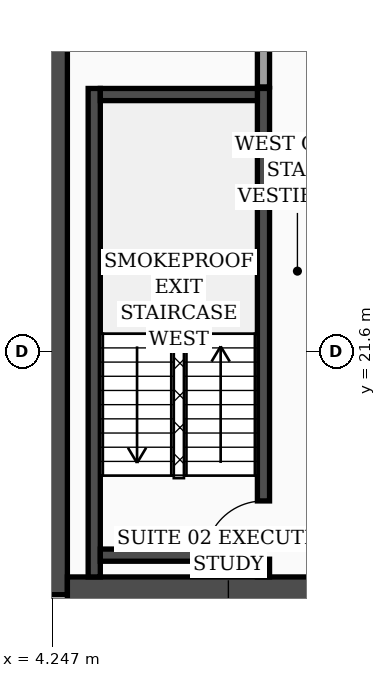
"""IFC4 building model, lengths in metres.
Left out: names, types, materials, properties, quantities, classifications, styles, units other than length and angle.
Written with IfcOpenShell. Run it as: python <this file> out.ifc"""

import sys

from ifc_helpers import new_model, si_unit, direction, frame, frame_2d, origin, place, context, subcontext, project, spatial, rectangle, extrude, element, fill, save


model = new_model("IFC4")
c1 = context("Model", 3, precision=1e-05, world=origin(), true_north=direction((0.0, 1.0)))
c2 = subcontext(c1, "Body", "Model", "MODEL_VIEW")
j1 = project(units=[si_unit("LENGTHUNIT", "METRE"), si_unit("PLANEANGLEUNIT", "RADIAN")], contexts=[c1])
p1 = place(None, origin())
s1 = spatial("IfcSite", under=j1, at=p1, CompositionType="ELEMENT")
p2 = place(p1, origin())
s2 = spatial("IfcBuilding", under=s1, at=p2, CompositionType="ELEMENT")
p3 = place(p2, frame((0.0, 0.0, 199.6)))
s3 = spatial("IfcBuildingStorey", under=s2, at=p3, CompositionType="ELEMENT", Elevation=199.6)
p4 = place(p3, frame((4.2, 16.8, 0.0), z_axis=(0.0, 0.0, 1.0), x_axis=(0.0, 1.0, 0.0)))
e1 = element("IfcWall", 1, at=p4, inside=s3, PredefinedType="SHEAR", context=c2, shape_type="SweptSolid", body=[
    extrude(rectangle(XDim=21.6, YDim=0.7, at=frame_2d((10.8, 0.0))), origin(), (0.0, 0.0, 1.0), 3.56),
])
p5 = place(p3, frame((4.55, 16.8, 0.0), z_axis=(0.0, 0.0, 1.0), x_axis=(1.0, 0.0, 0.0)))
e2 = element("IfcWall", 2, at=p5, inside=s3, PredefinedType="SHEAR", context=c2, shape_type="SweptSolid", body=[
    extrude(rectangle(XDim=10.1, YDim=0.7, at=frame_2d((5.05, 0.0))), origin(), (0.0, 0.0, 1.0), 3.56),
])
p6 = place(p3, frame((5.08, 17.15, 0.0), z_axis=(0.0, 0.0, 1.0), x_axis=(0.0, 1.0, 0.0)))
e3 = element("IfcWall", 3, at=p6, inside=s3, PredefinedType="SOLIDWALL", context=c2, shape_type="SweptSolid", body=[
    extrude(rectangle(XDim=9.64, YDim=0.24, at=frame_2d((4.82, 0.0))), origin(), (0.0, 0.0, 1.0), 3.56),
])
p7 = place(p3, frame((8.42, 17.15, 0.0), z_axis=(0.0, 0.0, 1.0), x_axis=(0.0, 1.0, 0.0)))
e4 = element("IfcWall", 4, at=p7, inside=s3, PredefinedType="SOLIDWALL", context=c2, shape_type="SweptSolid", body=[
    extrude(rectangle(XDim=9.64, YDim=0.24, at=frame_2d((4.82, 0.0))), origin(), (0.0, 0.0, 1.0), 3.56),
])
p8 = place(p7, frame((0.35, 0.0, 0.0)))
e5 = element("IfcOpeningElement", 5, at=p8, cuts=e4, PredefinedType="OPENING", context=c2, shape_type="SweptSolid", body=[
    extrude(rectangle(XDim=1.15, YDim=2.2, at=frame_2d((0.575, 1.1))), frame((0.0, 0.13, 0.0), z_axis=(0.0, -1.0, 0.0), x_axis=(1.0, 0.0, 0.0)), (0.0, 0.0, 1.0), 0.26),
])
for number, where, z_axis, x_axis in (
    (6, (5.2, 17.58, 0.0), (0.0, 0.0, 1.0), (1.0, 0.0, 0.0)),
    (7, (5.2, 26.67, 0.0), (0.0, 0.0, 1.0), (1.0, 0.0, 0.0)),
):
    element("IfcWall", number, at=place(p3, frame(where, z_axis=z_axis, x_axis=x_axis)), inside=s3, PredefinedType="SOLIDWALL", context=c2, shape_type="SweptSolid", body=[
        extrude(rectangle(XDim=3.1, YDim=0.24, at=frame_2d((1.55, 0.0))), origin(), (0.0, 0.0, 1.0), 3.56),
    ])
p9 = place(p3, frame((8.42, 26.82, 0.0), z_axis=(0.0, 0.0, 1.0), x_axis=(0.0, 1.0, 0.0)))
e8 = element("IfcWall", 8, at=p9, inside=s3, PredefinedType="SOLIDWALL", context=c2, shape_type="SweptSolid", body=[
    extrude(rectangle(XDim=3.0, YDim=0.24, at=frame_2d((1.5, 0.0))), origin(), (0.0, 0.0, 1.0), 3.56),
])
p10 = place(p9, frame((0.9, 0.0, 0.0)))
e9 = element("IfcOpeningElement", 9, at=p10, cuts=e8, PredefinedType="OPENING", context=c2, shape_type="SweptSolid", body=[
    extrude(rectangle(XDim=1.1, YDim=2.2, at=frame_2d((0.55, 1.1))), frame((0.0, 0.13, 0.0), z_axis=(0.0, -1.0, 0.0), x_axis=(1.0, 0.0, 0.0)), (0.0, 0.0, 1.0), 0.26),
])
p11 = place(p8, origin())
e10 = element("IfcDoor", 10, at=p11, inside=s3, OperationType="SINGLE_SWING_LEFT", PredefinedType="DOOR", context=c2, shape_type="SweptSolid", body=[
    extrude(rectangle(XDim=1.15, YDim=2.2, at=frame_2d((0.575, 1.1))), frame((0.0, 0.025, 0.0), z_axis=(0.0, -1.0, 0.0), x_axis=(1.0, 0.0, 0.0)), (0.0, 0.0, 1.0), 0.05),
])
fill(e5, e10)
save(model, sys.argv[1])
